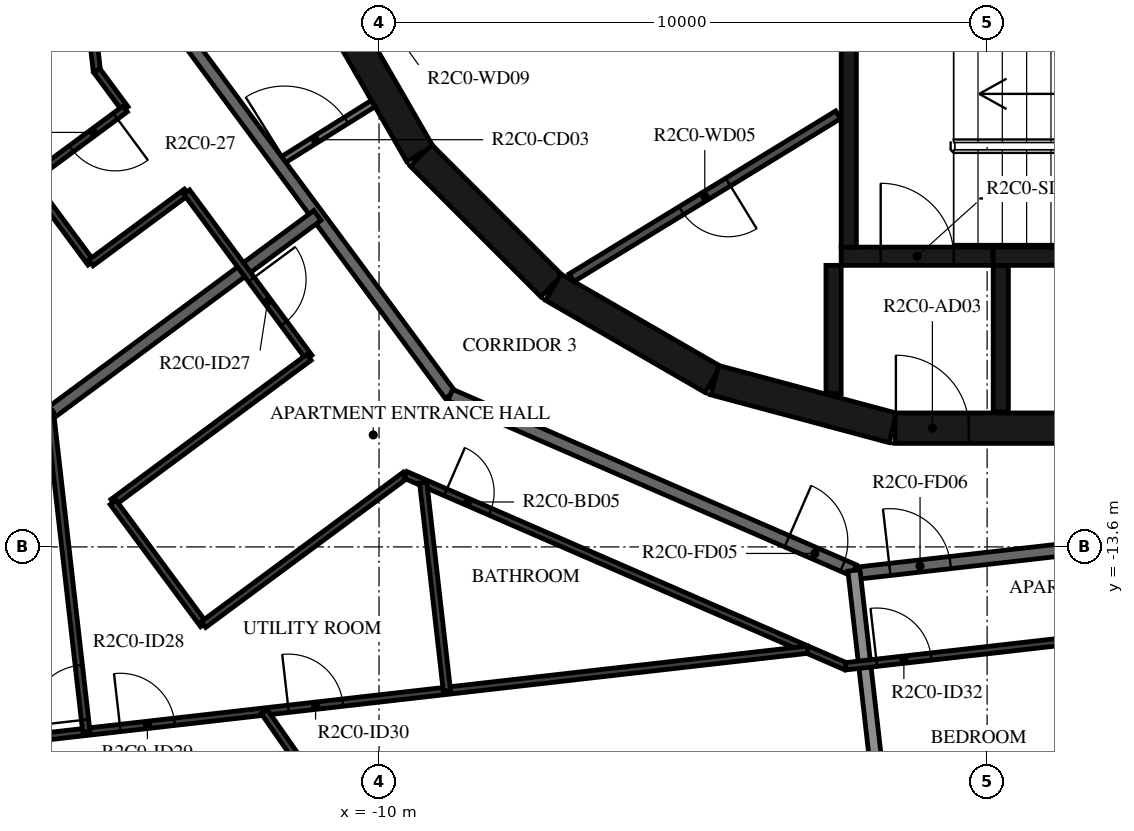
"""IFC4 building model, lengths in metres.
Left out: names, types, materials, properties, quantities, classifications, styles, units other than length and angle.
Written with IfcOpenShell. Run it as: python <this file> out.ifc"""

import sys

from ifc_helpers import new_model, si_unit, direction, frame, frame_2d, origin, place, context, subcontext, project, spatial, rectangle, extrude, element, fill, save


model = new_model("IFC4")
c1 = context("Model", 3, precision=1e-05, world=origin(), true_north=direction((0.0, 1.0)))
c2 = subcontext(c1, "Body", "Model", "MODEL_VIEW")
j1 = project(units=[si_unit("LENGTHUNIT", "METRE"), si_unit("PLANEANGLEUNIT", "RADIAN")], contexts=[c1])
p1 = place(None, origin())
s1 = spatial("IfcSite", under=j1, at=p1, CompositionType="ELEMENT")
p2 = place(p1, origin())
s2 = spatial("IfcBuilding", under=s1, at=p2, CompositionType="ELEMENT")
p3 = place(p2, frame((0.0, 0.0, 97.7)))
s3 = spatial("IfcBuildingStorey", under=s2, at=p3, CompositionType="ELEMENT", Elevation=97.7)
p4 = place(p3, frame((-10.845, -4.51, 0.0), z_axis=(0.0, 0.0, 1.0), x_axis=(0.500087131594, -0.865975092491, 0.0)))
e1 = element("IfcWall", 1, at=p4, inside=s3, PredefinedType="SHEAR", context=c2, shape_type="SweptSolid", body=[
    extrude(rectangle(XDim=3.033, YDim=0.5, at=frame_2d((1.516, 0.0))), origin(), (0.0, 0.0, 1.0), 3.12),
])
p5 = place(p3, frame((-9.308, -7.164, 0.0), z_axis=(0.0, 0.0, 1.0), x_axis=(0.707106781187, -0.707106781187, 0.0)))
e2 = element("IfcWall", 2, at=p5, inside=s3, PredefinedType="SHEAR", context=c2, shape_type="SweptSolid", body=[
    extrude(rectangle(XDim=3.032, YDim=0.5, at=frame_2d((1.516, 0.0))), origin(), (0.0, 0.0, 1.0), 3.12),
])
for number, where, z_axis, x_axis in (
    (3, (-7.137, -9.329, 0.0), (0.0, 0.0, 1.0), (0.866, -0.5, 0.0)),
    (4, (-4.479, -10.858, 0.0), (0.0, 0.0, 1.0), (0.966, -0.259, 0.0)),
):
    element("IfcWall", number, at=place(p3, frame(where, z_axis=z_axis, x_axis=x_axis)), inside=s3, PredefinedType="SHEAR", context=c2, shape_type="SweptSolid", body=[
        extrude(rectangle(XDim=3.033, YDim=0.5, at=frame_2d((1.516, 0.0))), origin(), (0.0, 0.0, 1.0), 3.12),
    ])
p6 = place(p3, frame((-1.516, -11.647, 0.0), z_axis=(0.0, 0.0, 1.0), x_axis=(1.0, 0.0, 0.0)))
e5 = element("IfcWall", 5, at=p6, inside=s3, PredefinedType="SHEAR", context=c2, shape_type="SweptSolid", body=[
    extrude(rectangle(XDim=3.033, YDim=0.5, at=frame_2d((1.516, 0.0))), origin(), (0.0, 0.0, 1.0), 3.12),
])
p7 = place(p6, frame((0.016, 0.0, 0.0)))
e6 = element("IfcOpeningElement", 6, at=p7, cuts=e5, PredefinedType="OPENING", context=c2, shape_type="SweptSolid", body=[
    extrude(rectangle(XDim=1.2, YDim=2.1, at=frame_2d((0.6, 1.05))), frame((0.0, 0.26, 0.0), z_axis=(0.0, -1.0, 0.0), x_axis=(1.0, 0.0, 0.0)), (0.0, 0.0, 1.0), 0.52),
])
p8 = place(p3, frame((-2.275, -8.67, 0.0), z_axis=(0.0, 0.0, 1.0), x_axis=(0.0, 1.0, 0.0)))
e7 = element("IfcWall", 7, at=p8, inside=s3, PredefinedType="SHEAR", context=c2, shape_type="SweptSolid", body=[
    extrude(rectangle(XDim=3.32, YDim=0.25, at=frame_2d((1.66, 0.0))), origin(), (0.0, 0.0, 1.0), 3.12),
])
p9 = place(p3, frame((0.1, -8.82, 0.0), z_axis=(0.0, 0.0, 1.0), x_axis=(1.0, 0.0, 0.0)))
e8 = element("IfcWall", 8, at=p9, inside=s3, PredefinedType="SHEAR", context=c2, shape_type="SweptSolid", body=[
    extrude(rectangle(XDim=4.55, YDim=0.3, at=frame_2d((2.275, 0.0))), origin(), (0.0, 0.0, 1.0), 3.12),
])
p10 = place(p3, frame((-2.4, -8.82, 0.0), z_axis=(0.0, 0.0, 1.0), x_axis=(1.0, 0.0, 0.0)))
e9 = element("IfcWall", 9, at=p10, inside=s3, PredefinedType="SHEAR", context=c2, shape_type="SweptSolid", body=[
    extrude(rectangle(XDim=2.5, YDim=0.3, at=frame_2d((1.25, 0.0))), origin(), (0.0, 0.0, 1.0), 3.12),
])
p11 = place(p10, frame((0.65, 0.0, 0.0)))
e10 = element("IfcOpeningElement", 10, at=p11, cuts=e9, PredefinedType="OPENING", context=c2, shape_type="SweptSolid", body=[
    extrude(rectangle(XDim=1.2, YDim=2.1, at=frame_2d((0.6, 1.05))), frame((0.0, 0.16, 0.0), z_axis=(0.0, -1.0, 0.0), x_axis=(1.0, 0.0, 0.0)), (0.0, 0.0, 1.0), 0.32),
])
p12 = place(p3, frame((-2.525, -8.97, 0.0), z_axis=(0.0, 0.0, 1.0), x_axis=(0.0, -1.0, 0.0)))
e11 = element("IfcWall", 11, at=p12, inside=s3, PredefinedType="SHEAR", context=c2, shape_type="SweptSolid", body=[
    extrude(rectangle(XDim=2.11, YDim=0.25, at=frame_2d((1.055, 0.0))), origin(), (0.0, 0.0, 1.0), 3.12),
])
p13 = place(p3, frame((0.225, -8.97, 0.0), z_axis=(0.0, 0.0, 1.0), x_axis=(0.0, -1.0, 0.0)))
e12 = element("IfcWall", 12, at=p13, inside=s3, PredefinedType="SHEAR", context=c2, shape_type="SweptSolid", body=[
    extrude(rectangle(XDim=2.41, YDim=0.25, at=frame_2d((1.205, 0.0))), origin(), (0.0, 0.0, 1.0), 3.12),
])
p14 = place(p3, frame((-2.451, -6.495, 0.0), z_axis=(0.0, 0.0, 1.0), x_axis=(-0.853250115418, -0.521501908471, 0.0)))
e13 = element("IfcWall", 13, at=p14, inside=s3, PredefinedType="PARTITIONING", context=c2, shape_type="SweptSolid", body=[
    extrude(rectangle(XDim=5.137, YDim=0.15, at=frame_2d((2.569, 0.0))), origin(), (0.0, 0.0, 1.0), 3.12),
])
p15 = place(p14, frame((2.119, 0.0, 0.0)))
e14 = element("IfcOpeningElement", 14, at=p15, cuts=e13, PredefinedType="OPENING", context=c2, shape_type="SweptSolid", body=[
    extrude(rectangle(XDim=0.9, YDim=2.1, at=frame_2d((0.45, 1.05))), frame((0.0, 0.085, 0.0), z_axis=(0.0, -1.0, 0.0), x_axis=(1.0, 0.0, 0.0)), (0.0, 0.0, 1.0), 0.17),
])
p16 = place(p3, frame((-11.654, -7.282, 0.0), z_axis=(0.0, 0.0, 1.0), x_axis=(0.848117698675, 0.529807860638, 0.0)))
e15 = element("IfcWall", 15, at=p16, inside=s3, PredefinedType="PARTITIONING", context=c2, shape_type="SweptSolid", body=[
    extrude(rectangle(XDim=1.838, YDim=0.12, at=frame_2d((0.919, 0.0))), origin(), (0.0, 0.0, 1.0), 3.12),
])
p17 = place(p16, frame((0.115, 0.0, 0.0)))
e16 = element("IfcOpeningElement", 16, at=p17, cuts=e15, PredefinedType="OPENING", context=c2, shape_type="SweptSolid", body=[
    extrude(rectangle(XDim=1.2, YDim=2.1, at=frame_2d((0.6, 1.05))), frame((0.0, 0.07, 0.0), z_axis=(0.0, -1.0, 0.0), x_axis=(1.0, 0.0, 0.0)), (0.0, 0.0, 1.0), 0.14),
])
p18 = place(p3, frame((-13.196, -5.198, 0.0), z_axis=(0.0, 0.0, 1.0), x_axis=(0.594805187394, -0.803869883159, 0.0)))
e17 = element("IfcWall", 17, at=p18, inside=s3, PredefinedType="STANDARD", context=c2, shape_type="SweptSolid", body=[
    extrude(rectangle(XDim=7.342, YDim=0.2, at=frame_2d((3.671, 0.0))), origin(), (0.0, 0.0, 1.0), 3.12),
])
p19 = place(p3, frame((-8.829, -11.1, 0.0), z_axis=(0.0, 0.0, 1.0), x_axis=(0.917063622491, -0.398740908742, 0.0)))
e18 = element("IfcWall", 18, at=p19, inside=s3, PredefinedType="STANDARD", context=c2, shape_type="SweptSolid", body=[
    extrude(rectangle(XDim=7.24, YDim=0.2, at=frame_2d((3.62, 0.0))), origin(), (0.0, 0.0, 1.0), 3.12),
])
p20 = place(p19, frame((6.04, 0.0, 0.0)))
e19 = element("IfcOpeningElement", 19, at=p20, cuts=e18, PredefinedType="OPENING", context=c2, shape_type="SweptSolid", body=[
    extrude(rectangle(XDim=1.0, YDim=2.1, at=frame_2d((0.5, 1.05))), frame((0.0, 0.11, 0.0), z_axis=(0.0, -1.0, 0.0), x_axis=(1.0, 0.0, 0.0)), (0.0, 0.0, 1.0), 0.22),
])
p21 = place(p3, frame((-2.096, -14.028, 0.0), z_axis=(0.0, 0.0, 1.0), x_axis=(0.993569170114, 0.113226782163, 0.0)))
e20 = element("IfcWall", 20, at=p21, inside=s3, PredefinedType="STANDARD", context=c2, shape_type="SweptSolid", body=[
    extrude(rectangle(XDim=7.342, YDim=0.2, at=frame_2d((3.671, 0.0))), origin(), (0.0, 0.0, 1.0), 3.12),
])
p22 = place(p21, frame((0.5, 0.0, 0.0)))
e21 = element("IfcOpeningElement", 21, at=p22, cuts=e20, PredefinedType="OPENING", context=c2, shape_type="SweptSolid", body=[
    extrude(rectangle(XDim=1.0, YDim=2.1, at=frame_2d((0.5, 1.05))), frame((0.0, 0.11, 0.0), z_axis=(0.0, -1.0, 0.0), x_axis=(1.0, 0.0, 0.0)), (0.0, 0.0, 1.0), 0.22),
])
p23 = place(p3, frame((-16.649, -12.32, 0.0), z_axis=(0.0, 0.0, 1.0), x_axis=(0.803869204071, 0.594806105169, 0.0)))
e22 = element("IfcWall", 22, at=p23, inside=s3, PredefinedType="STANDARD", context=c2, shape_type="SweptSolid", body=[
    extrude(rectangle(XDim=7.011, YDim=0.2, at=frame_2d((3.506, 0.0))), origin(), (0.0, 0.0, 1.0), 3.12),
])
p24 = place(p3, frame((-1.555, -19.559, 0.0), z_axis=(0.0, 0.0, 1.0), x_axis=(-0.113221250863, 0.993569800443, 0.0)))
e23 = element("IfcWall", 23, at=p24, inside=s3, PredefinedType="STANDARD", context=c2, shape_type="SweptSolid", body=[
    extrude(rectangle(XDim=5.609, YDim=0.2, at=frame_2d((2.804, 0.0))), origin(), (0.0, 0.0, 1.0), 2.73),
])
p25 = place(p3, frame((-15.563, 2.326, 0.0), z_axis=(0.0, 0.0, 1.0), x_axis=(0.11320423706, -0.993571739087, 0.0)))
e24 = element("IfcWall", 24, at=p25, inside=s3, PredefinedType="PARTITIONING", context=c2, shape_type="SweptSolid", body=[
    extrude(rectangle(XDim=8.146, YDim=0.12, at=frame_2d((4.073, 0.0))), origin(), (0.0, 0.0, 1.0), 3.12),
])
p26 = place(p25, frame((2.185, 0.0, 0.0)))
e25 = element("IfcOpeningElement", 25, at=p26, cuts=e24, PredefinedType="OPENING", context=c2, shape_type="SweptSolid", body=[
    extrude(rectangle(XDim=0.8, YDim=2.1, at=frame_2d((0.4, 1.05))), frame((0.0, 0.07, 0.0), z_axis=(0.0, -1.0, 0.0), x_axis=(1.0, 0.0, 0.0)), (0.0, 0.0, 1.0), 0.14),
])
p27 = place(p3, frame((-14.641, -5.767, 0.0), z_axis=(0.0, 0.0, 1.0), x_axis=(0.594601337861, -0.804020676982, 0.0)))
e26 = element("IfcWall", 26, at=p27, inside=s3, PredefinedType="PARTITIONING", context=c2, shape_type="SweptSolid", body=[
    extrude(rectangle(XDim=0.783, YDim=0.12, at=frame_2d((0.392, 0.0))), origin(), (0.0, 0.0, 1.0), 3.12),
])
p28 = place(p3, frame((-14.175, -6.397, 0.0), z_axis=(0.0, 0.0, 1.0), x_axis=(-0.803901491033, -0.594762467474, 0.0)))
e27 = element("IfcWall", 27, at=p28, inside=s3, PredefinedType="PARTITIONING", context=c2, shape_type="SweptSolid", body=[
    extrude(rectangle(XDim=1.959, YDim=0.12, at=frame_2d((0.979, 0.0))), origin(), (0.0, 0.0, 1.0), 3.12),
])
p29 = place(p28, frame((0.2, 0.0, 0.0)))
e28 = element("IfcOpeningElement", 28, at=p29, cuts=e27, PredefinedType="OPENING", context=c2, shape_type="SweptSolid", body=[
    extrude(rectangle(XDim=0.9, YDim=2.1, at=frame_2d((0.45, 1.05))), frame((0.0, 0.07, 0.0), z_axis=(0.0, -1.0, 0.0), x_axis=(1.0, 0.0, 0.0)), (0.0, 0.0, 1.0), 0.14),
])
p30 = place(p3, frame((-15.75, -7.562, 0.0), z_axis=(0.0, 0.0, 1.0), x_axis=(0.594863421241, -0.803826791087, 0.0)))
e29 = element("IfcWall", 29, at=p30, inside=s3, PredefinedType="PARTITIONING", context=c2, shape_type="SweptSolid", body=[
    extrude(rectangle(XDim=1.7, YDim=0.12, at=frame_2d((0.85, 0.0))), origin(), (0.0, 0.0, 1.0), 3.12),
])
p31 = place(p3, frame((-14.739, -8.929, 0.0), z_axis=(0.0, 0.0, 1.0), x_axis=(0.803901491033, 0.594762467474, 0.0)))
e30 = element("IfcWall", 30, at=p31, inside=s3, PredefinedType="PARTITIONING", context=c2, shape_type="SweptSolid", body=[
    extrude(rectangle(XDim=1.959, YDim=0.12, at=frame_2d((0.979, 0.0))), origin(), (0.0, 0.0, 1.0), 3.12),
])
p32 = place(p3, frame((-13.164, -7.764, 0.0), z_axis=(0.0, 0.0, 1.0), x_axis=(0.594837409261, -0.803846040324, 0.0)))
e31 = element("IfcWall", 31, at=p32, inside=s3, PredefinedType="PARTITIONING", context=c2, shape_type="SweptSolid", body=[
    extrude(rectangle(XDim=3.383, YDim=0.12, at=frame_2d((1.691, 0.0))), origin(), (0.0, 0.0, 1.0), 3.12),
])
p33 = place(p32, frame((1.789, 0.0, 0.0)))
e32 = element("IfcOpeningElement", 32, at=p33, cuts=e31, PredefinedType="OPENING", context=c2, shape_type="SweptSolid", body=[
    extrude(rectangle(XDim=0.9, YDim=2.1, at=frame_2d((0.45, 1.05))), frame((0.0, 0.07, 0.0), z_axis=(0.0, -1.0, 0.0), x_axis=(1.0, 0.0, 0.0)), (0.0, 0.0, 1.0), 0.14),
])
p34 = place(p3, frame((-11.152, -10.483, 0.0), z_axis=(0.0, 0.0, 1.0), x_axis=(-0.803843064298, -0.594841430954, 0.0)))
e33 = element("IfcWall", 33, at=p34, inside=s3, PredefinedType="PARTITIONING", context=c2, shape_type="SweptSolid", body=[
    extrude(rectangle(XDim=4.008, YDim=0.12, at=frame_2d((2.004, 0.0))), origin(), (0.0, 0.0, 1.0), 3.12),
])
p35 = place(p3, frame((-14.374, -12.867, 0.0), z_axis=(0.0, 0.0, 1.0), x_axis=(0.594800097121, -0.803873649565, 0.0)))
e34 = element("IfcWall", 34, at=p35, inside=s3, PredefinedType="PARTITIONING", context=c2, shape_type="SweptSolid", body=[
    extrude(rectangle(XDim=2.5, YDim=0.12, at=frame_2d((1.25, 0.0))), origin(), (0.0, 0.0, 1.0), 3.12),
])
p36 = place(p3, frame((-12.886, -14.877, 0.0), z_axis=(0.0, 0.0, 1.0), x_axis=(0.803816491389, 0.594877338761, 0.0)))
e35 = element("IfcWall", 35, at=p36, inside=s3, PredefinedType="PARTITIONING", context=c2, shape_type="SweptSolid", body=[
    extrude(rectangle(XDim=4.135, YDim=0.12, at=frame_2d((2.068, 0.0))), origin(), (0.0, 0.0, 1.0), 3.12),
])
p37 = place(p3, frame((-9.562, -12.417, 0.0), z_axis=(0.0, 0.0, 1.0), x_axis=(0.917063169851, -0.398741949767, 0.0)))
e36 = element("IfcWall", 36, at=p37, inside=s3, PredefinedType="PARTITIONING", context=c2, shape_type="SweptSolid", body=[
    extrude(rectangle(XDim=7.891, YDim=0.12, at=frame_2d((3.946, 0.0))), origin(), (0.0, 0.0, 1.0), 3.12),
])
p38 = place(p37, frame((0.715, 0.0, 0.0)))
e37 = element("IfcOpeningElement", 37, at=p38, cuts=e36, PredefinedType="OPENING", context=c2, shape_type="SweptSolid", body=[
    extrude(rectangle(XDim=0.8, YDim=2.1, at=frame_2d((0.4, 1.05))), frame((0.0, 0.07, 0.0), z_axis=(0.0, -1.0, 0.0), x_axis=(1.0, 0.0, 0.0)), (0.0, 0.0, 1.0), 0.14),
])
p39 = place(p3, frame((-2.326, -15.563, 0.0), z_axis=(0.0, 0.0, 1.0), x_axis=(0.993575068384, 0.113175012641, 0.0)))
e38 = element("IfcWall", 38, at=p39, inside=s3, PredefinedType="PARTITIONING", context=c2, shape_type="SweptSolid", body=[
    extrude(rectangle(XDim=3.799, YDim=0.12, at=frame_2d((1.899, 0.0))), origin(), (0.0, 0.0, 1.0), 3.12),
])
p40 = place(p39, frame((0.513, 0.0, 0.0)))
e39 = element("IfcOpeningElement", 39, at=p40, cuts=e38, PredefinedType="OPENING", context=c2, shape_type="SweptSolid", body=[
    extrude(rectangle(XDim=0.9, YDim=2.1, at=frame_2d((0.45, 1.05))), frame((0.0, 0.07, 0.0), z_axis=(0.0, -1.0, 0.0), x_axis=(1.0, 0.0, 0.0)), (0.0, 0.0, 1.0), 0.14),
])
p41 = place(p3, frame((-17.437, -16.94, 0.0), z_axis=(0.0, 0.0, 1.0), x_axis=(0.993573314119, 0.113190412448, 0.0)))
e40 = element("IfcWall", 40, at=p41, inside=s3, PredefinedType="PARTITIONING", context=c2, shape_type="SweptSolid", body=[
    extrude(rectangle(XDim=14.576, YDim=0.12, at=frame_2d((7.288, 0.0))), origin(), (0.0, 0.0, 1.0), 3.12),
])
p42 = place(p41, frame((3.201, 0.0, 0.0)))
e41 = element("IfcOpeningElement", 41, at=p42, cuts=e40, PredefinedType="OPENING", context=c2, shape_type="SweptSolid", body=[
    extrude(rectangle(XDim=0.9, YDim=2.1, at=frame_2d((0.45, 1.05))), frame((0.0, 0.07, 0.0), z_axis=(0.0, -1.0, 0.0), x_axis=(1.0, 0.0, 0.0)), (0.0, 0.0, 1.0), 0.14),
])
p43 = place(p41, frame((5.985, 0.0, 0.0)))
e42 = element("IfcOpeningElement", 42, at=p43, cuts=e40, PredefinedType="OPENING", context=c2, shape_type="SweptSolid", body=[
    extrude(rectangle(XDim=0.9, YDim=2.1, at=frame_2d((0.45, 1.05))), frame((0.0, 0.07, 0.0), z_axis=(0.0, -1.0, 0.0), x_axis=(1.0, 0.0, 0.0)), (0.0, 0.0, 1.0), 0.14),
])
p44 = place(p3, frame((-14.813, -16.641, 0.0), z_axis=(0.0, 0.0, 1.0), x_axis=(-0.113210971478, 0.993570971767, 0.0)))
e43 = element("IfcWall", 43, at=p44, inside=s3, PredefinedType="PARTITIONING", context=c2, shape_type="SweptSolid", body=[
    extrude(rectangle(XDim=5.273, YDim=0.12, at=frame_2d((2.636, 0.0))), origin(), (0.0, 0.0, 1.0), 3.12),
])
p45 = place(p44, frame((0.2, 0.0, 0.0)))
e44 = element("IfcOpeningElement", 44, at=p45, cuts=e43, PredefinedType="OPENING", context=c2, shape_type="SweptSolid", body=[
    extrude(rectangle(XDim=0.9, YDim=2.1, at=frame_2d((0.45, 1.05))), frame((0.0, 0.07, 0.0), z_axis=(0.0, -1.0, 0.0), x_axis=(1.0, 0.0, 0.0)), (0.0, 0.0, 1.0), 0.14),
])
p46 = place(p3, frame((-8.884, -15.966, 0.0), z_axis=(0.0, 0.0, 1.0), x_axis=(-0.113230836929, 0.993568708026, 0.0)))
e45 = element("IfcWall", 45, at=p46, inside=s3, PredefinedType="PARTITIONING", context=c2, shape_type="SweptSolid", body=[
    extrude(rectangle(XDim=3.446, YDim=0.12, at=frame_2d((1.723, 0.0))), origin(), (0.0, 0.0, 1.0), 3.12),
])
p47 = place(p3, frame((-9.026, -20.41, 0.0), z_axis=(0.0, 0.0, 1.0), x_axis=(-0.57218083256, 0.82012748695, 0.0)))
e46 = element("IfcWall", 46, at=p47, inside=s3, PredefinedType="PARTITIONING", context=c2, shape_type="SweptSolid", body=[
    extrude(rectangle(XDim=5.002, YDim=0.12, at=frame_2d((2.501, 0.0))), origin(), (0.0, 0.0, 1.0), 3.12),
])
p48 = place(p11, origin())
e47 = element("IfcDoor", 47, at=p48, inside=s3, OperationType="SINGLE_SWING_LEFT", PredefinedType="DOOR", context=c2, shape_type="SweptSolid", body=[
    extrude(rectangle(XDim=1.2, YDim=2.1, at=frame_2d((0.6, 1.05))), frame((0.0, 0.025, 0.0), z_axis=(0.0, -1.0, 0.0), x_axis=(1.0, 0.0, 0.0)), (0.0, 0.0, 1.0), 0.05),
])
fill(e10, e47)
p49 = place(p7, origin())
e48 = element("IfcDoor", 48, at=p49, inside=s3, OperationType="SINGLE_SWING_RIGHT", PredefinedType="DOOR", context=c2, shape_type="SweptSolid", body=[
    extrude(rectangle(XDim=1.2, YDim=2.1, at=frame_2d((0.6, 1.05))), frame((0.0, 0.025, 0.0), z_axis=(0.0, -1.0, 0.0), x_axis=(1.0, 0.0, 0.0)), (0.0, 0.0, 1.0), 0.05),
])
fill(e6, e48)
p50 = place(p15, origin())
e49 = element("IfcDoor", 49, at=p50, inside=s3, OperationType="SINGLE_SWING_RIGHT", PredefinedType="DOOR", context=c2, shape_type="SweptSolid", body=[
    extrude(rectangle(XDim=0.9, YDim=2.1, at=frame_2d((0.45, 1.05))), frame((0.0, 0.025, 0.0), z_axis=(0.0, -1.0, 0.0), x_axis=(1.0, 0.0, 0.0)), (0.0, 0.0, 1.0), 0.05),
])
fill(e14, e49)
p51 = place(p29, origin())
e50 = element("IfcDoor", 50, at=p51, inside=s3, OperationType="SINGLE_SWING_RIGHT", PredefinedType="DOOR", context=c2, shape_type="SweptSolid", body=[
    extrude(rectangle(XDim=0.9, YDim=2.1, at=frame_2d((0.45, 1.05))), frame((0.0, 0.025, 0.0), z_axis=(0.0, -1.0, 0.0), x_axis=(1.0, 0.0, 0.0)), (0.0, 0.0, 1.0), 0.05),
])
fill(e28, e50)
p52 = place(p20, origin())
e51 = element("IfcDoor", 51, at=p52, inside=s3, OperationType="SINGLE_SWING_LEFT", PredefinedType="DOOR", context=c2, shape_type="SweptSolid", body=[
    extrude(rectangle(XDim=1.0, YDim=2.1, at=frame_2d((0.5, 1.05))), frame((0.0, 0.025, 0.0), z_axis=(0.0, -1.0, 0.0), x_axis=(1.0, 0.0, 0.0)), (0.0, 0.0, 1.0), 0.05),
])
fill(e19, e51)
p53 = place(p33, origin())
e52 = element("IfcDoor", 52, at=p53, inside=s3, OperationType="SINGLE_SWING_LEFT", PredefinedType="DOOR", context=c2, shape_type="SweptSolid", body=[
    extrude(rectangle(XDim=0.9, YDim=2.1, at=frame_2d((0.45, 1.05))), frame((0.0, 0.025, 0.0), z_axis=(0.0, -1.0, 0.0), x_axis=(1.0, 0.0, 0.0)), (0.0, 0.0, 1.0), 0.05),
])
fill(e32, e52)
p54 = place(p38, origin())
e53 = element("IfcDoor", 53, at=p54, inside=s3, OperationType="SINGLE_SWING_LEFT", PredefinedType="DOOR", context=c2, shape_type="SweptSolid", body=[
    extrude(rectangle(XDim=0.8, YDim=2.1, at=frame_2d((0.4, 1.05))), frame((0.0, 0.025, 0.0), z_axis=(0.0, -1.0, 0.0), x_axis=(1.0, 0.0, 0.0)), (0.0, 0.0, 1.0), 0.05),
])
fill(e37, e53)
p55 = place(p45, origin())
e54 = element("IfcDoor", 54, at=p55, inside=s3, OperationType="SINGLE_SWING_LEFT", PredefinedType="DOOR", context=c2, shape_type="SweptSolid", body=[
    extrude(rectangle(XDim=0.9, YDim=2.1, at=frame_2d((0.45, 1.05))), frame((0.0, 0.025, 0.0), z_axis=(0.0, -1.0, 0.0), x_axis=(1.0, 0.0, 0.0)), (0.0, 0.0, 1.0), 0.05),
])
fill(e44, e54)
p56 = place(p42, origin())
e55 = element("IfcDoor", 55, at=p56, inside=s3, OperationType="SINGLE_SWING_LEFT", PredefinedType="DOOR", context=c2, shape_type="SweptSolid", body=[
    extrude(rectangle(XDim=0.9, YDim=2.1, at=frame_2d((0.45, 1.05))), frame((0.0, 0.025, 0.0), z_axis=(0.0, -1.0, 0.0), x_axis=(1.0, 0.0, 0.0)), (0.0, 0.0, 1.0), 0.05),
])
fill(e41, e55)
p57 = place(p43, origin())
e56 = element("IfcDoor", 56, at=p57, inside=s3, OperationType="SINGLE_SWING_LEFT", PredefinedType="DOOR", context=c2, shape_type="SweptSolid", body=[
    extrude(rectangle(XDim=0.9, YDim=2.1, at=frame_2d((0.45, 1.05))), frame((0.0, 0.025, 0.0), z_axis=(0.0, -1.0, 0.0), x_axis=(1.0, 0.0, 0.0)), (0.0, 0.0, 1.0), 0.05),
])
fill(e42, e56)
p58 = place(p22, origin())
e57 = element("IfcDoor", 57, at=p58, inside=s3, OperationType="SINGLE_SWING_LEFT", PredefinedType="DOOR", context=c2, shape_type="SweptSolid", body=[
    extrude(rectangle(XDim=1.0, YDim=2.1, at=frame_2d((0.5, 1.05))), frame((0.0, 0.025, 0.0), z_axis=(0.0, -1.0, 0.0), x_axis=(1.0, 0.0, 0.0)), (0.0, 0.0, 1.0), 0.05),
])
fill(e21, e57)
p59 = place(p40, origin())
e58 = element("IfcDoor", 58, at=p59, inside=s3, OperationType="SINGLE_SWING_LEFT", PredefinedType="DOOR", context=c2, shape_type="SweptSolid", body=[
    extrude(rectangle(XDim=0.9, YDim=2.1, at=frame_2d((0.45, 1.05))), frame((0.0, 0.025, 0.0), z_axis=(0.0, -1.0, 0.0), x_axis=(1.0, 0.0, 0.0)), (0.0, 0.0, 1.0), 0.05),
])
fill(e39, e58)
p60 = place(p17, origin())
e59 = element("IfcDoor", 59, at=p60, inside=s3, OperationType="DOUBLE_DOOR_SINGLE_SWING", PredefinedType="DOOR", context=c2, shape_type="SweptSolid", body=[
    extrude(rectangle(XDim=1.2, YDim=2.1, at=frame_2d((0.6, 1.05))), frame((0.0, 0.025, 0.0), z_axis=(0.0, -1.0, 0.0), x_axis=(1.0, 0.0, 0.0)), (0.0, 0.0, 1.0), 0.05),
])
fill(e16, e59)
save(model, sys.argv[1])
